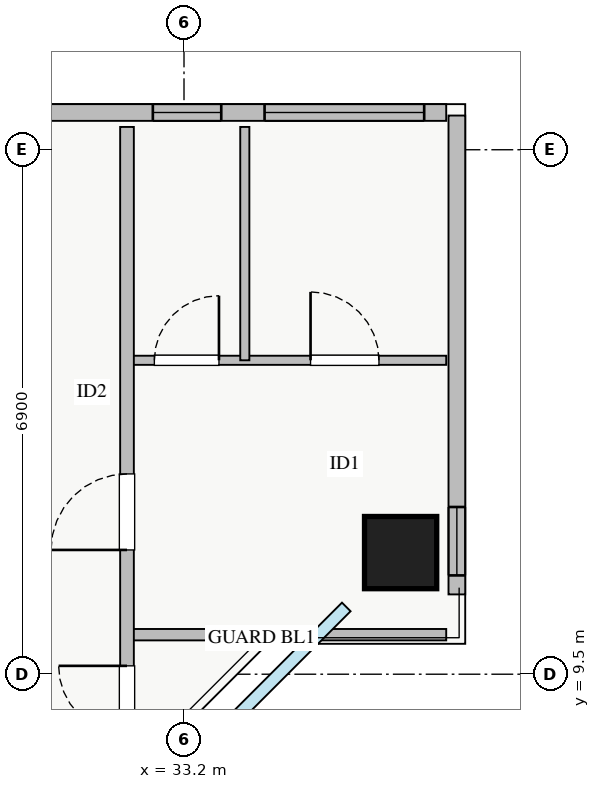
"""IFC4 building model, lengths in metres.
Left out: names, types, materials, properties, quantities, classifications, styles, units other than length and angle.
Written with IfcOpenShell. Run it as: python <this file> out.ifc"""

import sys

from ifc_helpers import new_model, si_unit, direction, frame, frame_2d, origin, origin_2d, place, context, subcontext, project, spatial, rectangle, extrude, source, transform, mapped, element, fill, save


model = new_model("IFC4")
c1 = context("Model", 3, precision=1e-05, world=origin(), true_north=direction((0.0, 1.0)))
c2 = subcontext(c1, "Body", "Model", "MODEL_VIEW")
j1 = project(units=[si_unit("LENGTHUNIT", "METRE"), si_unit("PLANEANGLEUNIT", "RADIAN")], contexts=[c1])
p1 = place(None, origin())
s1 = spatial("IfcSite", under=j1, at=p1, CompositionType="ELEMENT")
p2 = place(p1, origin())
s2 = spatial("IfcBuilding", under=s1, at=p2, CompositionType="ELEMENT")
p3 = place(p2, frame((0.0, 0.0, 160.0)))
s3 = spatial("IfcBuildingStorey", under=s2, at=p3, CompositionType="ELEMENT", Elevation=160.0)
m1 = source(origin(), c2, "Body", "SweptSolid", [
    extrude(rectangle(XDim=0.95, YDim=0.95, at=origin_2d()), origin(), (0.0, 0.0, 1.0), 3.25),
])
p4 = place(p3, frame((36.05, 11.1, 0.0), z_axis=(0.0, 0.0, 1.0), x_axis=(1.0, 0.0, 0.0)))
e1 = element("IfcColumn", 1, at=p4, inside=s3, PredefinedType="COLUMN", context=c2, shape_type="MappedRepresentation", body=[
    mapped(m1, transform((0.0, 0.0, 0.0), x_axis=(1.0, 0.0, 0.0), y_axis=(0.0, 1.0, 0.0), z_axis=(0.0, 0.0, 1.0), scale=1.0)),
])
p5 = place(p3, frame((27.78, 16.89, 0.0), z_axis=(0.0, 0.0, 1.0), x_axis=(1.0, 0.0, 0.0)))
e2 = element("IfcWall", 2, at=p5, inside=s3, PredefinedType="STANDARD", context=c2, shape_type="SweptSolid", body=[
    extrude(rectangle(XDim=8.87, YDim=0.22, at=frame_2d((4.435, 0.0))), origin(), (0.0, 0.0, 1.0), 2.61),
])
p6 = place(p5, frame((1.22, 0.0, 0.9)))
e3 = element("IfcOpeningElement", 3, at=p6, cuts=e2, PredefinedType="OPENING", context=c2, shape_type="SweptSolid", body=[
    extrude(rectangle(XDim=2.1, YDim=1.48, at=frame_2d((1.05, 0.74))), frame((0.0, 0.12, 0.0), z_axis=(0.0, -1.0, 0.0), x_axis=(1.0, 0.0, 0.0)), (0.0, 0.0, 1.0), 0.24),
])
p7 = place(p5, frame((6.48, 0.0, 0.9)))
e4 = element("IfcOpeningElement", 4, at=p7, cuts=e2, PredefinedType="OPENING", context=c2, shape_type="SweptSolid", body=[
    extrude(rectangle(XDim=2.1, YDim=1.5, at=frame_2d((1.05, 0.75))), frame((0.0, 0.12, 0.0), z_axis=(0.0, -1.0, 0.0), x_axis=(1.0, 0.0, 0.0)), (0.0, 0.0, 1.0), 0.24),
])
p8 = place(p5, frame((5.01, 0.0, 0.9)))
e5 = element("IfcOpeningElement", 5, at=p8, cuts=e2, PredefinedType="OPENING", context=c2, shape_type="SweptSolid", body=[
    extrude(rectangle(XDim=0.9, YDim=1.2, at=frame_2d((0.45, 0.6))), frame((0.0, 0.12, 0.0), z_axis=(0.0, -1.0, 0.0), x_axis=(1.0, 0.0, 0.0)), (0.0, 0.0, 1.0), 0.24),
])
p9 = place(p3, frame((36.79, 10.55, 0.0), z_axis=(0.0, 0.0, 1.0), x_axis=(0.0, 1.0, 0.0)))
e6 = element("IfcWall", 6, at=p9, inside=s3, PredefinedType="STANDARD", context=c2, shape_type="SweptSolid", body=[
    extrude(rectangle(XDim=6.3, YDim=0.22, at=frame_2d((3.15, 0.0))), origin(), (0.0, 0.0, 1.0), 2.61),
])
p10 = place(p9, frame((0.25, 0.0, 0.9)))
e7 = element("IfcOpeningElement", 7, at=p10, cuts=e6, PredefinedType="OPENING", context=c2, shape_type="SweptSolid", body=[
    extrude(rectangle(XDim=0.9, YDim=1.2, at=frame_2d((0.45, 0.6))), frame((0.0, 0.12, 0.0), z_axis=(0.0, -1.0, 0.0), x_axis=(1.0, 0.0, 0.0)), (0.0, 0.0, 1.0), 0.24),
])
p11 = place(p3, frame((32.45, 13.63, 0.0), z_axis=(0.0, 0.0, 1.0), x_axis=(1.0, 0.0, 0.0)))
e8 = element("IfcWall", 8, at=p11, inside=s3, PredefinedType="PLUMBINGWALL", context=c2, shape_type="SweptSolid", body=[
    extrude(rectangle(XDim=4.2, YDim=0.12, at=frame_2d((2.1, 0.0))), origin(), (0.0, 0.0, 1.0), 3.07),
])
p12 = place(p11, frame((0.36, 0.0, 0.0)))
e9 = element("IfcOpeningElement", 9, at=p12, cuts=e8, PredefinedType="OPENING", context=c2, shape_type="SweptSolid", body=[
    extrude(rectangle(XDim=0.85, YDim=2.05, at=frame_2d((0.425, 1.025))), frame((0.0, 0.07, 0.0), z_axis=(0.0, -1.0, 0.0), x_axis=(1.0, 0.0, 0.0)), (0.0, 0.0, 1.0), 0.14),
])
p13 = place(p11, frame((2.415, 0.0, 0.0)))
e10 = element("IfcOpeningElement", 10, at=p13, cuts=e8, PredefinedType="OPENING", context=c2, shape_type="SweptSolid", body=[
    extrude(rectangle(XDim=0.9, YDim=2.05, at=frame_2d((0.45, 1.025))), frame((0.0, 0.07, 0.0), z_axis=(0.0, -1.0, 0.0), x_axis=(1.0, 0.0, 0.0)), (0.0, 0.0, 1.0), 0.14),
])
p14 = place(p3, frame((34.0, 13.63, 0.0), z_axis=(0.0, 0.0, 1.0), x_axis=(0.0, 1.0, 0.0)))
e11 = element("IfcWall", 11, at=p14, inside=s3, PredefinedType="PLUMBINGWALL", context=c2, shape_type="SweptSolid", body=[
    extrude(rectangle(XDim=3.07, YDim=0.12, at=frame_2d((1.535, 0.0))), origin(), (0.0, 0.0, 1.0), 3.07),
])
p15 = place(p3, frame((32.45, 10.02, 0.0), z_axis=(0.0, 0.0, 1.0), x_axis=(1.0, 0.0, 0.0)))
e12 = element("IfcWall", 12, at=p15, inside=s3, PredefinedType="PARTITIONING", context=c2, shape_type="SweptSolid", body=[
    extrude(rectangle(XDim=4.2, YDim=0.15, at=frame_2d((2.1, 0.0))), origin(), (0.0, 0.0, 1.0), 3.07),
])
p16 = place(p3, frame((32.45, 5.35, 0.0), z_axis=(0.0, 0.0, 1.0), x_axis=(0.0, 1.0, 0.0)))
e13 = element("IfcWall", 13, at=p16, inside=s3, PredefinedType="PARTITIONING", context=c2, shape_type="SweptSolid", body=[
    extrude(rectangle(XDim=11.35, YDim=0.18, at=frame_2d((5.675, 0.0))), origin(), (0.0, 0.0, 1.0), 3.07),
])
p17 = place(p16, frame((3.36, 0.0, 0.0)))
e14 = element("IfcOpeningElement", 14, at=p17, cuts=e13, PredefinedType="OPENING", context=c2, shape_type="SweptSolid", body=[
    extrude(rectangle(XDim=0.9, YDim=2.05, at=frame_2d((0.45, 1.025))), frame((0.0, 0.1, 0.0), z_axis=(0.0, -1.0, 0.0), x_axis=(1.0, 0.0, 0.0)), (0.0, 0.0, 1.0), 0.2),
])
p18 = place(p16, frame((5.785, 0.0, 0.0)))
e15 = element("IfcOpeningElement", 15, at=p18, cuts=e13, PredefinedType="OPENING", context=c2, shape_type="SweptSolid", body=[
    extrude(rectangle(XDim=1.0, YDim=2.05, at=frame_2d((0.5, 1.025))), frame((0.0, 0.1, 0.0), z_axis=(0.0, -1.0, 0.0), x_axis=(1.0, 0.0, 0.0)), (0.0, 0.0, 1.0), 0.2),
])
m2 = source(origin(), c2, "Body", "SweptSolid", [
    extrude(rectangle(XDim=2.1, YDim=1.5, at=frame_2d((1.05, 0.75))), frame((0.0, 0.03, 0.0), z_axis=(0.0, -1.0, 0.0), x_axis=(1.0, 0.0, 0.0)), (0.0, 0.0, 1.0), 0.06),
])
p19 = place(p7, origin())
e16 = element("IfcWindow", 16, at=p19, inside=s3, PartitioningType="TRIPLE_PANEL_VERTICAL", PredefinedType="WINDOW", context=c2, shape_type="MappedRepresentation", body=[
    mapped(m2, transform((0.0, 0.0, 0.0), x_axis=(1.0, 0.0, 0.0), y_axis=(0.0, 1.0, 0.0), z_axis=(0.0, 0.0, 1.0), scale=1.0)),
])
fill(e4, e16)
m3 = source(origin(), c2, "Body", "SweptSolid", [
    extrude(rectangle(XDim=0.85, YDim=2.05, at=frame_2d((0.425, 1.025))), frame((0.0, 0.025, 0.0), z_axis=(0.0, -1.0, 0.0), x_axis=(1.0, 0.0, 0.0)), (0.0, 0.0, 1.0), 0.05),
])
p20 = place(p12, origin())
e17 = element("IfcDoor", 17, at=p20, inside=s3, OperationType="SINGLE_SWING_RIGHT", PredefinedType="DOOR", context=c2, shape_type="MappedRepresentation", body=[
    mapped(m3, transform((0.0, 0.0, 0.0), x_axis=(1.0, 0.0, 0.0), y_axis=(0.0, 1.0, 0.0), z_axis=(0.0, 0.0, 1.0), scale=1.0)),
])
fill(e9, e17)
m4 = source(origin(), c2, "Body", "SweptSolid", [
    extrude(rectangle(XDim=0.9, YDim=2.05, at=frame_2d((0.45, 1.025))), frame((0.0, 0.025, 0.0), z_axis=(0.0, -1.0, 0.0), x_axis=(1.0, 0.0, 0.0)), (0.0, 0.0, 1.0), 0.05),
])
p21 = place(p13, origin())
e18 = element("IfcDoor", 18, at=p21, inside=s3, OperationType="SINGLE_SWING_LEFT", PredefinedType="DOOR", context=c2, shape_type="MappedRepresentation", body=[
    mapped(m4, transform((0.0, 0.0, 0.0), x_axis=(1.0, 0.0, 0.0), y_axis=(0.0, 1.0, 0.0), z_axis=(0.0, 0.0, 1.0), scale=1.0)),
])
fill(e10, e18)
p22 = place(p17, origin())
e19 = element("IfcDoor", 19, at=p22, inside=s3, OperationType="SINGLE_SWING_RIGHT", PredefinedType="DOOR", context=c2, shape_type="MappedRepresentation", body=[
    mapped(m4, transform((0.0, 0.0, 0.0), x_axis=(1.0, 0.0, 0.0), y_axis=(0.0, 1.0, 0.0), z_axis=(0.0, 0.0, 1.0), scale=1.0)),
])
fill(e14, e19)
m5 = source(origin(), c2, "Body", "SweptSolid", [
    extrude(rectangle(XDim=1.0, YDim=2.05, at=frame_2d((0.5, 1.025))), frame((0.0, 0.025, 0.0), z_axis=(0.0, -1.0, 0.0), x_axis=(1.0, 0.0, 0.0)), (0.0, 0.0, 1.0), 0.05),
])
p23 = place(p18, origin())
e20 = element("IfcDoor", 20, at=p23, inside=s3, OperationType="SINGLE_SWING_LEFT", PredefinedType="DOOR", context=c2, shape_type="MappedRepresentation", body=[
    mapped(m5, transform((0.0, 0.0, 0.0), x_axis=(1.0, 0.0, 0.0), y_axis=(0.0, 1.0, 0.0), z_axis=(0.0, 0.0, 1.0), scale=1.0)),
])
fill(e15, e20)
m6 = source(origin(), c2, "Body", "SweptSolid", [
    extrude(rectangle(XDim=0.9, YDim=1.2, at=frame_2d((0.45, 0.6))), frame((0.0, 0.03, 0.0), z_axis=(0.0, -1.0, 0.0), x_axis=(1.0, 0.0, 0.0)), (0.0, 0.0, 1.0), 0.06),
])
p24 = place(p8, origin())
e21 = element("IfcWindow", 21, at=p24, inside=s3, PartitioningType="SINGLE_PANEL", PredefinedType="WINDOW", context=c2, shape_type="MappedRepresentation", body=[
    mapped(m6, transform((0.0, 0.0, 0.0), x_axis=(1.0, 0.0, 0.0), y_axis=(0.0, 1.0, 0.0), z_axis=(0.0, 0.0, 1.0), scale=1.0)),
])
fill(e5, e21)
p25 = place(p10, origin())
e22 = element("IfcWindow", 22, at=p25, inside=s3, PartitioningType="SINGLE_PANEL", PredefinedType="WINDOW", context=c2, shape_type="MappedRepresentation", body=[
    mapped(m6, transform((0.0, 0.0, 0.0), x_axis=(1.0, 0.0, 0.0), y_axis=(0.0, 1.0, 0.0), z_axis=(0.0, 0.0, 1.0), scale=1.0)),
])
fill(e7, e22)
save(model, sys.argv[1])
